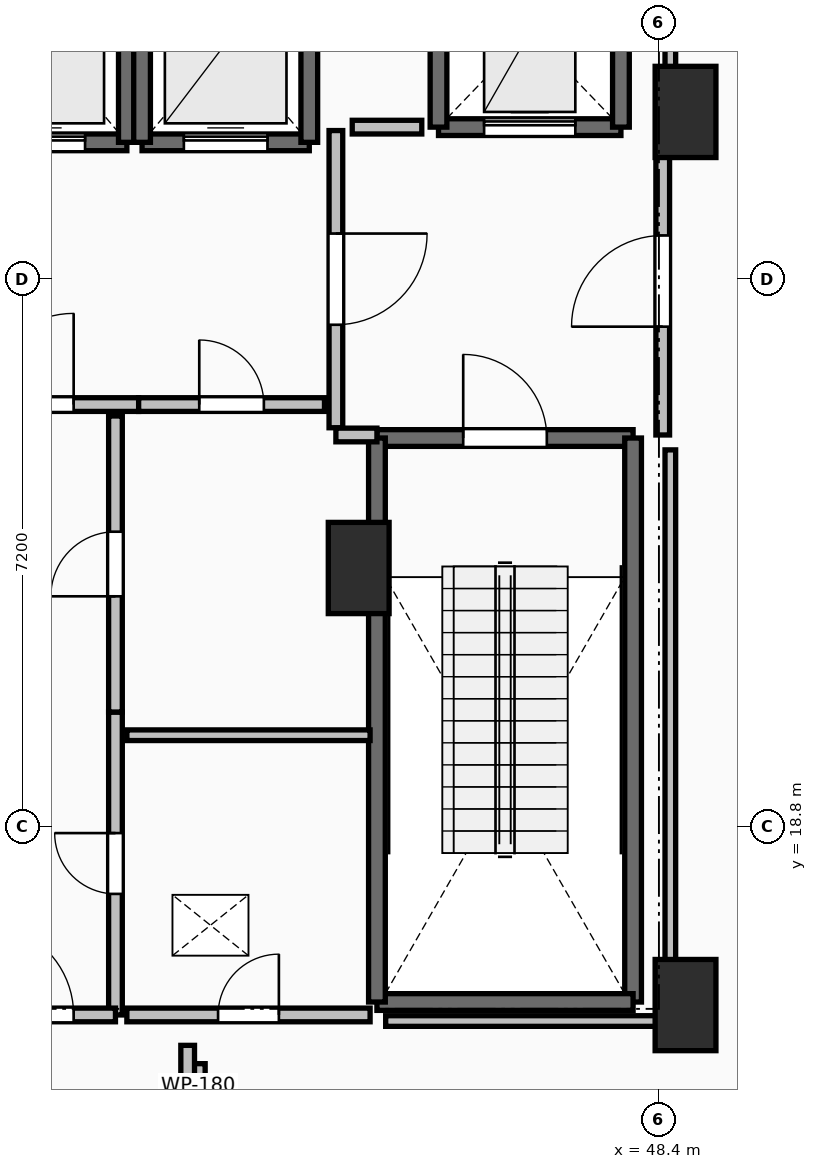
"""IFC4 building model, lengths in metres.
Left out: names, types, materials, properties, quantities, classifications, styles, units other than length and angle.
Written with IfcOpenShell. Run it as: python <this file> out.ifc"""

import sys

from ifc_helpers import new_model, si_unit, direction, frame, frame_2d, origin, origin_2d, place, context, subcontext, project, spatial, rectangle, extrude, element, fill, save


model = new_model("IFC4")
c1 = context("Model", 3, precision=1e-05, world=origin(), true_north=direction((0.0, 1.0)))
c2 = subcontext(c1, "Body", "Model", "MODEL_VIEW")
j1 = project(units=[si_unit("LENGTHUNIT", "METRE"), si_unit("PLANEANGLEUNIT", "RADIAN")], contexts=[c1])
p1 = place(None, origin())
s1 = spatial("IfcSite", under=j1, at=p1, CompositionType="ELEMENT")
p2 = place(p1, origin())
s2 = spatial("IfcBuilding", under=s1, at=p2, CompositionType="ELEMENT")
p3 = place(p2, origin())
s3 = spatial("IfcBuildingStorey", under=s2, at=p3, CompositionType="ELEMENT", Elevation=0.0)
for number, where, z_axis, x_axis in (
    (1, (48.75, 28.2, 0.0), (0.0, 0.0, 1.0), (1.0, 0.0, 0.0)),
    (2, (48.75, 16.45, 0.0), (0.0, 0.0, 1.0), (1.0, 0.0, 0.0)),
    (3, (44.45, 22.2, 0.0), (0.0, 0.0, 1.0), (1.0, 0.0, 0.0)),
):
    element("IfcColumn", number, at=place(p3, frame(where, z_axis=z_axis, x_axis=x_axis)), inside=s3, PredefinedType="PILASTER", context=c2, shape_type="SweptSolid", body=[
        extrude(rectangle(XDim=0.8, YDim=1.2, at=origin_2d()), origin(), (0.0, 0.0, 1.0), 4.8),
    ])
p4 = place(p3, frame((44.69, 23.91, 0.0), z_axis=(0.0, 0.0, 1.0), x_axis=(1.0, 0.0, 0.0)))
e4 = element("IfcWall", 4, at=p4, inside=s3, PredefinedType="SOLIDWALL", context=c2, shape_type="SweptSolid", body=[
    extrude(rectangle(XDim=3.37, YDim=0.22, at=frame_2d((1.685, 0.0))), origin(), (0.0, 0.0, 1.0), 4.48),
])
p5 = place(p4, frame((1.135, 0.0, 0.0)))
e5 = element("IfcOpeningElement", 5, at=p5, cuts=e4, PredefinedType="OPENING", context=c2, shape_type="SweptSolid", body=[
    extrude(rectangle(XDim=1.1, YDim=2.15, at=frame_2d((0.55, 1.075))), frame((0.0, 0.125, 0.0), z_axis=(0.0, -1.0, 0.0), x_axis=(1.0, 0.0, 0.0)), (0.0, 0.0, 1.0), 0.25),
])
p6 = place(p3, frame((48.06, 23.91, 0.0), z_axis=(0.0, 0.0, 1.0), x_axis=(0.0, -1.0, 0.0)))
e6 = element("IfcWall", 6, at=p6, inside=s3, PredefinedType="SOLIDWALL", context=c2, shape_type="SweptSolid", body=[
    extrude(rectangle(XDim=7.42, YDim=0.22, at=frame_2d((3.71, 0.0))), origin(), (0.0, 0.0, 1.0), 4.48),
])
p7 = place(p3, frame((48.06, 16.49, 0.0), z_axis=(0.0, 0.0, 1.0), x_axis=(-1.0, 0.0, 0.0)))
e7 = element("IfcWall", 7, at=p7, inside=s3, PredefinedType="SOLIDWALL", context=c2, shape_type="SweptSolid", body=[
    extrude(rectangle(XDim=3.37, YDim=0.22, at=frame_2d((1.685, 0.0))), origin(), (0.0, 0.0, 1.0), 4.48),
])
p8 = place(p3, frame((44.69, 16.49, 0.0), z_axis=(0.0, 0.0, 1.0), x_axis=(0.0, 1.0, 0.0)))
e8 = element("IfcWall", 8, at=p8, inside=s3, PredefinedType="SOLIDWALL", context=c2, shape_type="SweptSolid", body=[
    extrude(rectangle(XDim=7.42, YDim=0.22, at=frame_2d((3.71, 0.0))), origin(), (0.0, 0.0, 1.0), 4.48),
])
p9 = place(p3, frame((39.2, 27.8, 0.0), z_axis=(0.0, 0.0, 1.0), x_axis=(1.0, 0.0, 0.0)))
e9 = element("IfcWall", 9, at=p9, inside=s3, PredefinedType="SOLIDWALL", context=c2, shape_type="SweptSolid", body=[
    extrude(rectangle(XDim=2.2, YDim=0.22, at=frame_2d((1.1, 0.0))), origin(), (0.0, 0.0, 1.0), 4.48),
])
p10 = place(p9, frame((0.55, 0.0, 0.0)))
e10 = element("IfcOpeningElement", 10, at=p10, cuts=e9, PredefinedType="OPENING", context=c2, shape_type="SweptSolid", body=[
    extrude(rectangle(XDim=1.1, YDim=2.2, at=frame_2d((0.55, 1.1))), frame((0.0, 0.125, 0.0), z_axis=(0.0, -1.0, 0.0), x_axis=(1.0, 0.0, 0.0)), (0.0, 0.0, 1.0), 0.25),
])
p11 = place(p3, frame((41.4, 27.8, 0.0), z_axis=(0.0, 0.0, 1.0), x_axis=(0.0, 1.0, 0.0)))
e11 = element("IfcWall", 11, at=p11, inside=s3, PredefinedType="SOLIDWALL", context=c2, shape_type="SweptSolid", body=[
    extrude(rectangle(XDim=2.6, YDim=0.22, at=frame_2d((1.3, 0.0))), origin(), (0.0, 0.0, 1.0), 4.48),
])
p12 = place(p3, frame((41.6, 27.8, 0.0), z_axis=(0.0, 0.0, 1.0), x_axis=(1.0, 0.0, 0.0)))
e12 = element("IfcWall", 12, at=p12, inside=s3, PredefinedType="SOLIDWALL", context=c2, shape_type="SweptSolid", body=[
    extrude(rectangle(XDim=2.2, YDim=0.22, at=frame_2d((1.1, 0.0))), origin(), (0.0, 0.0, 1.0), 4.48),
])
p13 = place(p12, frame((0.55, 0.0, 0.0)))
e13 = element("IfcOpeningElement", 13, at=p13, cuts=e12, PredefinedType="OPENING", context=c2, shape_type="SweptSolid", body=[
    extrude(rectangle(XDim=1.1, YDim=2.2, at=frame_2d((0.55, 1.1))), frame((0.0, 0.125, 0.0), z_axis=(0.0, -1.0, 0.0), x_axis=(1.0, 0.0, 0.0)), (0.0, 0.0, 1.0), 0.25),
])
for number, where, z_axis, x_axis in (
    (14, (43.8, 27.8, 0.0), (0.0, 0.0, 1.0), (0.0, 1.0, 0.0)),
    (15, (41.6, 30.4, 0.0), (0.0, 0.0, 1.0), (0.0, -1.0, 0.0)),
):
    element("IfcWall", number, at=place(p3, frame(where, z_axis=z_axis, x_axis=x_axis)), inside=s3, PredefinedType="SOLIDWALL", context=c2, shape_type="SweptSolid", body=[
        extrude(rectangle(XDim=2.6, YDim=0.22, at=frame_2d((1.3, 0.0))), origin(), (0.0, 0.0, 1.0), 4.48),
    ])
p14 = place(p3, frame((45.5, 28.0, 0.0), z_axis=(0.0, 0.0, 1.0), x_axis=(1.0, 0.0, 0.0)))
e16 = element("IfcWall", 16, at=p14, inside=s3, PredefinedType="SHEAR", context=c2, shape_type="SweptSolid", body=[
    extrude(rectangle(XDim=2.4, YDim=0.22, at=frame_2d((1.2, 0.0))), origin(), (0.0, 0.0, 1.0), 4.48),
])
p15 = place(p14, frame((0.6, 0.0, 0.0)))
e17 = element("IfcOpeningElement", 17, at=p15, cuts=e16, PredefinedType="OPENING", context=c2, shape_type="SweptSolid", body=[
    extrude(rectangle(XDim=1.2, YDim=2.2, at=frame_2d((0.6, 1.1))), frame((0.0, 0.125, 0.0), z_axis=(0.0, -1.0, 0.0), x_axis=(1.0, 0.0, 0.0)), (0.0, 0.0, 1.0), 0.25),
])
for number, where, z_axis, x_axis in (
    (18, (47.9, 28.0, 0.0), (0.0, 0.0, 1.0), (0.0, 1.0, 0.0)),
    (19, (45.5, 30.5, 0.0), (0.0, 0.0, 1.0), (0.0, -1.0, 0.0)),
):
    element("IfcWall", number, at=place(p3, frame(where, z_axis=z_axis, x_axis=x_axis)), inside=s3, PredefinedType="SHEAR", context=c2, shape_type="SweptSolid", body=[
        extrude(rectangle(XDim=2.5, YDim=0.22, at=frame_2d((1.25, 0.0))), origin(), (0.0, 0.0, 1.0), 4.48),
    ])
p16 = place(p3, frame((44.15, 27.955, 0.0), z_axis=(0.0, 0.0, 1.0), x_axis=(0.0, -1.0, 0.0)))
e20 = element("IfcWall", 20, at=p16, inside=s3, PredefinedType="PARTITIONING", context=c2, shape_type="SweptSolid", body=[
    extrude(rectangle(XDim=3.91, YDim=0.18, at=frame_2d((1.955, 0.0))), origin(), (0.0, 0.0, 1.0), 4.48),
])
p17 = place(p16, frame((1.355, 0.0, 0.0)))
e21 = element("IfcOpeningElement", 21, at=p17, cuts=e20, PredefinedType="OPENING", context=c2, shape_type="SweptSolid", body=[
    extrude(rectangle(XDim=1.2, YDim=2.15, at=frame_2d((0.6, 1.075))), frame((0.0, 0.105, 0.0), z_axis=(0.0, -1.0, 0.0), x_axis=(1.0, 0.0, 0.0)), (0.0, 0.0, 1.0), 0.21),
])
p18 = place(p3, frame((44.15, 23.95, 0.0), z_axis=(0.0, 0.0, 1.0), x_axis=(1.0, 0.0, 0.0)))
e22 = element("IfcWall", 22, at=p18, inside=s3, PredefinedType="PARTITIONING", context=c2, shape_type="SweptSolid", body=[
    extrude(rectangle(XDim=0.54, YDim=0.18, at=frame_2d((0.27, 0.0))), origin(), (0.0, 0.0, 1.0), 4.48),
])
p19 = place(p3, frame((48.45, 23.95, 0.0), z_axis=(0.0, 0.0, 1.0), x_axis=(0.0, 1.0, 0.0)))
e23 = element("IfcWall", 23, at=p19, inside=s3, PredefinedType="PARTITIONING", context=c2, shape_type="SweptSolid", body=[
    extrude(rectangle(XDim=4.05, YDim=0.18, at=frame_2d((2.025, 0.0))), origin(), (0.0, 0.0, 1.0), 4.48),
])
p20 = place(p19, frame((1.425, 0.0, 0.0)))
e24 = element("IfcOpeningElement", 24, at=p20, cuts=e23, PredefinedType="OPENING", context=c2, shape_type="SweptSolid", body=[
    extrude(rectangle(XDim=1.2, YDim=2.15, at=frame_2d((0.6, 1.075))), frame((0.0, 0.105, 0.0), z_axis=(0.0, -1.0, 0.0), x_axis=(1.0, 0.0, 0.0)), (0.0, 0.0, 1.0), 0.21),
])
p21 = place(p3, frame((38.645, 24.35, 0.0), z_axis=(0.0, 0.0, 1.0), x_axis=(1.0, 0.0, 0.0)))
e25 = element("IfcWall", 25, at=p21, inside=s3, PredefinedType="PARTITIONING", context=c2, shape_type="SweptSolid", body=[
    extrude(rectangle(XDim=2.91, YDim=0.18, at=frame_2d((1.455, 0.0))), origin(), (0.0, 0.0, 1.0), 4.48),
])
p22 = place(p21, frame((0.855, 0.0, 0.0)))
e26 = element("IfcOpeningElement", 26, at=p22, cuts=e25, PredefinedType="OPENING", context=c2, shape_type="SweptSolid", body=[
    extrude(rectangle(XDim=1.2, YDim=2.15, at=frame_2d((0.6, 1.075))), frame((0.0, 0.105, 0.0), z_axis=(0.0, -1.0, 0.0), x_axis=(1.0, 0.0, 0.0)), (0.0, 0.0, 1.0), 0.21),
])
p23 = place(p3, frame((41.555, 24.35, 0.0), z_axis=(0.0, 0.0, 1.0), x_axis=(1.0, 0.0, 0.0)))
e27 = element("IfcWall", 27, at=p23, inside=s3, PredefinedType="PARTITIONING", context=c2, shape_type="SweptSolid", body=[
    extrude(rectangle(XDim=2.445, YDim=0.18, at=frame_2d((1.223, 0.0))), origin(), (0.0, 0.0, 1.0), 4.48),
])
p24 = place(p23, frame((0.798, 0.0, 0.0)))
e28 = element("IfcOpeningElement", 28, at=p24, cuts=e27, PredefinedType="OPENING", context=c2, shape_type="SweptSolid", body=[
    extrude(rectangle(XDim=0.85, YDim=2.1, at=frame_2d((0.425, 1.05))), frame((0.0, 0.105, 0.0), z_axis=(0.0, -1.0, 0.0), x_axis=(1.0, 0.0, 0.0)), (0.0, 0.0, 1.0), 0.21),
])
p25 = place(p3, frame((41.25, 16.32, 0.0), z_axis=(0.0, 0.0, 1.0), x_axis=(0.0, 1.0, 0.0)))
e29 = element("IfcWall", 29, at=p25, inside=s3, PredefinedType="PARTITIONING", context=c2, shape_type="SweptSolid", body=[
    extrude(rectangle(XDim=3.985, YDim=0.18, at=frame_2d((1.992, 0.0))), origin(), (0.0, 0.0, 1.0), 4.48),
])
p26 = place(p25, frame((1.593, 0.0, 0.0)))
e30 = element("IfcOpeningElement", 30, at=p26, cuts=e29, PredefinedType="OPENING", context=c2, shape_type="SweptSolid", body=[
    extrude(rectangle(XDim=0.8, YDim=2.05, at=frame_2d((0.4, 1.025))), frame((0.0, 0.105, 0.0), z_axis=(0.0, -1.0, 0.0), x_axis=(1.0, 0.0, 0.0)), (0.0, 0.0, 1.0), 0.21),
])
p27 = place(p3, frame((41.25, 20.305, 0.0), z_axis=(0.0, 0.0, 1.0), x_axis=(0.0, 1.0, 0.0)))
e31 = element("IfcWall", 31, at=p27, inside=s3, PredefinedType="PARTITIONING", context=c2, shape_type="SweptSolid", body=[
    extrude(rectangle(XDim=3.895, YDim=0.18, at=frame_2d((1.948, 0.0))), origin(), (0.0, 0.0, 1.0), 4.48),
])
p28 = place(p27, frame((1.522, 0.0, 0.0)))
e32 = element("IfcOpeningElement", 32, at=p28, cuts=e31, PredefinedType="OPENING", context=c2, shape_type="SweptSolid", body=[
    extrude(rectangle(XDim=0.85, YDim=2.1, at=frame_2d((0.425, 1.05))), frame((0.0, 0.105, 0.0), z_axis=(0.0, -1.0, 0.0), x_axis=(1.0, 0.0, 0.0)), (0.0, 0.0, 1.0), 0.21),
])
p29 = place(p3, frame((38.95, 16.32, 0.0), z_axis=(0.0, 0.0, 1.0), x_axis=(1.0, 0.0, 0.0)))
e33 = element("IfcWall", 33, at=p29, inside=s3, PredefinedType="PARTITIONING", context=c2, shape_type="SweptSolid", body=[
    extrude(rectangle(XDim=2.3, YDim=0.18, at=frame_2d((1.15, 0.0))), origin(), (0.0, 0.0, 1.0), 4.48),
])
p30 = place(p29, frame((0.55, 0.0, 0.0)))
e34 = element("IfcOpeningElement", 34, at=p30, cuts=e33, PredefinedType="OPENING", context=c2, shape_type="SweptSolid", body=[
    extrude(rectangle(XDim=1.2, YDim=2.15, at=frame_2d((0.6, 1.075))), frame((0.0, 0.105, 0.0), z_axis=(0.0, -1.0, 0.0), x_axis=(1.0, 0.0, 0.0)), (0.0, 0.0, 1.0), 0.21),
])
p31 = place(p3, frame((44.6, 20.0, 0.0), z_axis=(0.0, 0.0, 1.0), x_axis=(-1.0, 0.0, 0.0)))
e35 = element("IfcWall", 35, at=p31, inside=s3, PredefinedType="PARTITIONING", context=c2, shape_type="SweptSolid", body=[
    extrude(rectangle(XDim=3.2, YDim=0.14, at=frame_2d((1.6, 0.0))), origin(), (0.0, 0.0, 1.0), 4.48),
])
p32 = place(p3, frame((41.4, 16.32, 0.0), z_axis=(0.0, 0.0, 1.0), x_axis=(1.0, 0.0, 0.0)))
e36 = element("IfcWall", 36, at=p32, inside=s3, PredefinedType="PARTITIONING", context=c2, shape_type="SweptSolid", body=[
    extrude(rectangle(XDim=3.2, YDim=0.18, at=frame_2d((1.6, 0.0))), origin(), (0.0, 0.0, 1.0), 4.48),
])
p33 = place(p32, frame((1.2, 0.0, 0.0)))
e37 = element("IfcOpeningElement", 37, at=p33, cuts=e36, PredefinedType="OPENING", context=c2, shape_type="SweptSolid", body=[
    extrude(rectangle(XDim=0.8, YDim=2.05, at=frame_2d((0.4, 1.025))), frame((0.0, 0.105, 0.0), z_axis=(0.0, -1.0, 0.0), x_axis=(1.0, 0.0, 0.0)), (0.0, 0.0, 1.0), 0.21),
])
p34 = place(p3, frame((42.34, 15.679, 0.0), z_axis=(0.0, 0.0, 1.0), x_axis=(0.0, -1.0, 0.0)))
e38 = element("IfcWall", 38, at=p34, inside=s3, PredefinedType="PARTITIONING", context=c2, shape_type="SweptSolid", body=[
    extrude(rectangle(XDim=1.579, YDim=0.18, at=frame_2d((0.79, 0.0))), origin(), (0.0, 0.0, 1.0), 4.48),
])
p35 = place(p3, frame((42.2, 14.1, 0.0), z_axis=(0.0, 0.0, 1.0), x_axis=(0.0, 1.0, 0.0)))
e39 = element("IfcWall", 39, at=p35, inside=s3, PredefinedType="PARTITIONING", context=c2, shape_type="SweptSolid", body=[
    extrude(rectangle(XDim=1.82, YDim=0.18, at=frame_2d((0.91, 0.0))), origin(), (0.0, 0.0, 1.0), 4.48),
])
p36 = place(p3, frame((45.28, 28.0, 0.0), z_axis=(0.0, 0.0, 1.0), x_axis=(-1.0, 0.0, 0.0)))
e40 = element("IfcWall", 40, at=p36, inside=s3, PredefinedType="PARTITIONING", context=c2, shape_type="SweptSolid", body=[
    extrude(rectangle(XDim=0.915, YDim=0.18, at=frame_2d((0.458, 0.0))), origin(), (0.0, 0.0, 1.0), 4.48),
])
p37 = place(p3, frame((48.55, 33.45, 0.0), z_axis=(0.0, 0.0, 1.0), x_axis=(0.0, -1.0, 0.0)))
e41 = element("IfcWall", 41, at=p37, inside=s3, PredefinedType="PARTITIONING", context=c2, shape_type="SweptSolid", body=[
    extrude(rectangle(XDim=5.254, YDim=0.14, at=frame_2d((2.627, 0.0))), origin(), (0.0, 0.0, 1.0), 3.672),
])
p38 = place(p3, frame((48.55, 23.754, 0.0), z_axis=(0.0, 0.0, 1.0), x_axis=(0.0, -1.0, 0.0)))
e42 = element("IfcWall", 42, at=p38, inside=s3, PredefinedType="PARTITIONING", context=c2, shape_type="SweptSolid", body=[
    extrude(rectangle(XDim=7.514, YDim=0.14, at=frame_2d((3.757, 0.0))), origin(), (0.0, 0.0, 1.0), 2.406),
])
p39 = place(p3, frame((48.55, 16.24, 0.0), z_axis=(0.0, 0.0, 1.0), x_axis=(-1.0, 0.0, 0.0)))
e43 = element("IfcWall", 43, at=p39, inside=s3, PredefinedType="PARTITIONING", context=c2, shape_type="SweptSolid", body=[
    extrude(rectangle(XDim=3.745, YDim=0.14, at=frame_2d((1.873, 0.0))), origin(), (0.0, 0.0, 1.0), 3.672),
])
p40 = place(p5, origin())
e44 = element("IfcDoor", 44, at=p40, inside=s3, OperationType="SINGLE_SWING_LEFT", PredefinedType="DOOR", context=c2, shape_type="SweptSolid", body=[
    extrude(rectangle(XDim=1.1, YDim=2.15, at=frame_2d((0.55, 1.075))), frame((0.0, 0.025, 0.0), z_axis=(0.0, -1.0, 0.0), x_axis=(1.0, 0.0, 0.0)), (0.0, 0.0, 1.0), 0.05),
])
fill(e5, e44)
p41 = place(p10, origin())
e45 = element("IfcDoor", 45, at=p41, inside=s3, OperationType="SLIDING_TO_LEFT", PredefinedType="DOOR", context=c2, shape_type="SweptSolid", body=[
    extrude(rectangle(XDim=1.1, YDim=2.2, at=frame_2d((0.55, 1.1))), frame((0.0, 0.025, 0.0), z_axis=(0.0, -1.0, 0.0), x_axis=(1.0, 0.0, 0.0)), (0.0, 0.0, 1.0), 0.05),
])
fill(e10, e45)
p42 = place(p13, origin())
e46 = element("IfcDoor", 46, at=p42, inside=s3, OperationType="SLIDING_TO_LEFT", PredefinedType="DOOR", context=c2, shape_type="SweptSolid", body=[
    extrude(rectangle(XDim=1.1, YDim=2.2, at=frame_2d((0.55, 1.1))), frame((0.0, 0.025, 0.0), z_axis=(0.0, -1.0, 0.0), x_axis=(1.0, 0.0, 0.0)), (0.0, 0.0, 1.0), 0.05),
])
fill(e13, e46)
p43 = place(p15, origin())
e47 = element("IfcDoor", 47, at=p43, inside=s3, OperationType="SLIDING_TO_LEFT", PredefinedType="DOOR", context=c2, shape_type="SweptSolid", body=[
    extrude(rectangle(XDim=1.2, YDim=2.2, at=frame_2d((0.6, 1.1))), frame((0.0, 0.025, 0.0), z_axis=(0.0, -1.0, 0.0), x_axis=(1.0, 0.0, 0.0)), (0.0, 0.0, 1.0), 0.05),
])
fill(e17, e47)
p44 = place(p17, origin())
e48 = element("IfcDoor", 48, at=p44, inside=s3, OperationType="SINGLE_SWING_LEFT", PredefinedType="DOOR", context=c2, shape_type="SweptSolid", body=[
    extrude(rectangle(XDim=1.2, YDim=2.15, at=frame_2d((0.6, 1.075))), frame((0.0, 0.025, 0.0), z_axis=(0.0, -1.0, 0.0), x_axis=(1.0, 0.0, 0.0)), (0.0, 0.0, 1.0), 0.05),
])
fill(e21, e48)
p45 = place(p20, origin())
e49 = element("IfcDoor", 49, at=p45, inside=s3, OperationType="SINGLE_SWING_LEFT", PredefinedType="DOOR", context=c2, shape_type="SweptSolid", body=[
    extrude(rectangle(XDim=1.2, YDim=2.15, at=frame_2d((0.6, 1.075))), frame((0.0, 0.025, 0.0), z_axis=(0.0, -1.0, 0.0), x_axis=(1.0, 0.0, 0.0)), (0.0, 0.0, 1.0), 0.05),
])
fill(e24, e49)
p46 = place(p22, origin())
e50 = element("IfcDoor", 50, at=p46, inside=s3, OperationType="SINGLE_SWING_RIGHT", PredefinedType="DOOR", context=c2, shape_type="SweptSolid", body=[
    extrude(rectangle(XDim=1.2, YDim=2.15, at=frame_2d((0.6, 1.075))), frame((0.0, 0.025, 0.0), z_axis=(0.0, -1.0, 0.0), x_axis=(1.0, 0.0, 0.0)), (0.0, 0.0, 1.0), 0.05),
])
fill(e26, e50)
p47 = place(p24, origin())
e51 = element("IfcDoor", 51, at=p47, inside=s3, OperationType="SINGLE_SWING_LEFT", PredefinedType="DOOR", context=c2, shape_type="SweptSolid", body=[
    extrude(rectangle(XDim=0.85, YDim=2.1, at=frame_2d((0.425, 1.05))), frame((0.0, 0.025, 0.0), z_axis=(0.0, -1.0, 0.0), x_axis=(1.0, 0.0, 0.0)), (0.0, 0.0, 1.0), 0.05),
])
fill(e28, e51)
p48 = place(p26, origin())
e52 = element("IfcDoor", 52, at=p48, inside=s3, OperationType="SINGLE_SWING_RIGHT", PredefinedType="DOOR", context=c2, shape_type="SweptSolid", body=[
    extrude(rectangle(XDim=0.8, YDim=2.05, at=frame_2d((0.4, 1.025))), frame((0.0, 0.025, 0.0), z_axis=(0.0, -1.0, 0.0), x_axis=(1.0, 0.0, 0.0)), (0.0, 0.0, 1.0), 0.05),
])
fill(e30, e52)
p49 = place(p28, origin())
e53 = element("IfcDoor", 53, at=p49, inside=s3, OperationType="SINGLE_SWING_LEFT", PredefinedType="DOOR", context=c2, shape_type="SweptSolid", body=[
    extrude(rectangle(XDim=0.85, YDim=2.1, at=frame_2d((0.425, 1.05))), frame((0.0, 0.025, 0.0), z_axis=(0.0, -1.0, 0.0), x_axis=(1.0, 0.0, 0.0)), (0.0, 0.0, 1.0), 0.05),
])
fill(e32, e53)
p50 = place(p30, origin())
e54 = element("IfcDoor", 54, at=p50, inside=s3, OperationType="SINGLE_SWING_LEFT", PredefinedType="DOOR", context=c2, shape_type="SweptSolid", body=[
    extrude(rectangle(XDim=1.2, YDim=2.15, at=frame_2d((0.6, 1.075))), frame((0.0, 0.025, 0.0), z_axis=(0.0, -1.0, 0.0), x_axis=(1.0, 0.0, 0.0)), (0.0, 0.0, 1.0), 0.05),
])
fill(e34, e54)
p51 = place(p33, origin())
e55 = element("IfcDoor", 55, at=p51, inside=s3, OperationType="SINGLE_SWING_RIGHT", PredefinedType="DOOR", context=c2, shape_type="SweptSolid", body=[
    extrude(rectangle(XDim=0.8, YDim=2.05, at=frame_2d((0.4, 1.025))), frame((0.0, 0.025, 0.0), z_axis=(0.0, -1.0, 0.0), x_axis=(1.0, 0.0, 0.0)), (0.0, 0.0, 1.0), 0.05),
])
fill(e37, e55)
save(model, sys.argv[1])
